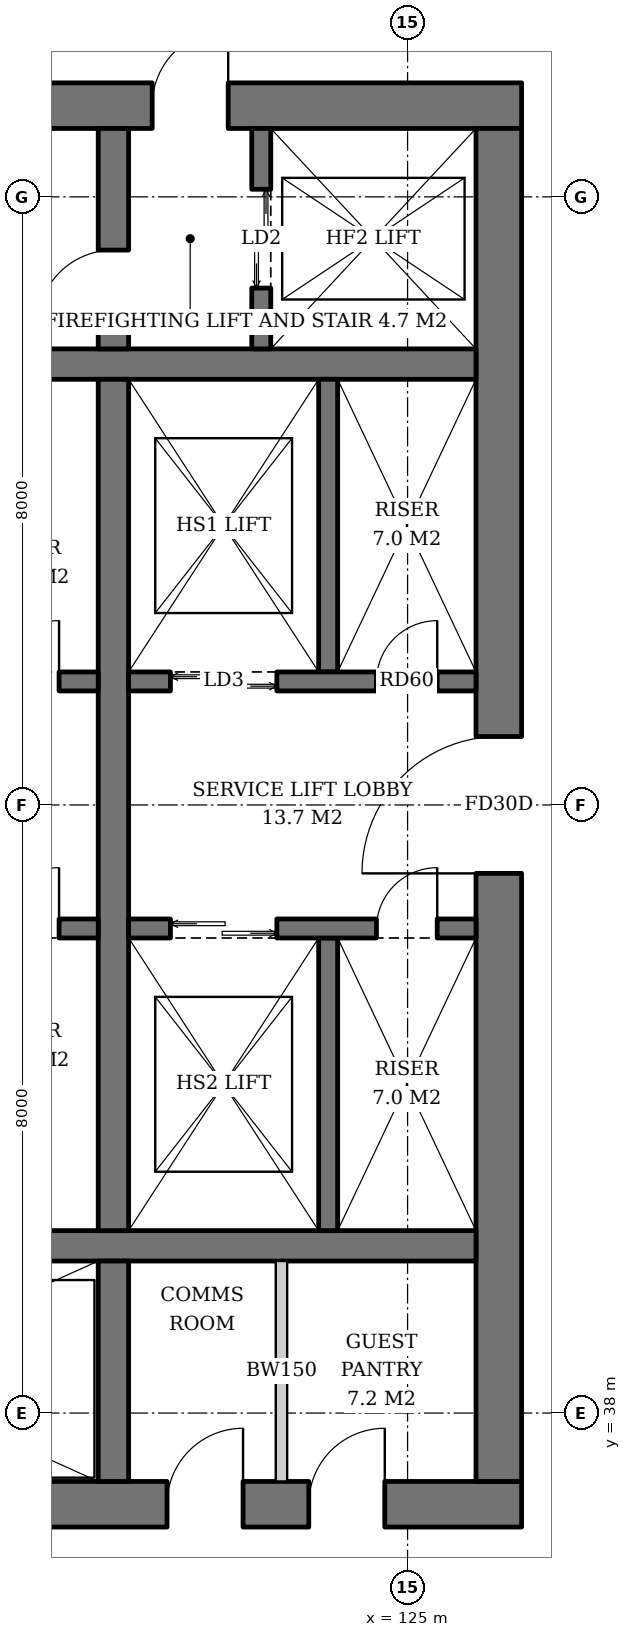
"""IFC4 building model, lengths in metres.
Left out: names, types, materials, properties, quantities, classifications, styles, units other than length and angle.
Written with IfcOpenShell. Run it as: python <this file> out.ifc"""

import sys

from ifc_helpers import new_model, si_unit, direction, frame, frame_2d, origin, place, context, subcontext, project, spatial, rectangle, extrude, element, fill, save


model = new_model("IFC4")
c1 = context("Model", 3, precision=1e-05, world=origin(), true_north=direction((0.0, 1.0)))
c2 = subcontext(c1, "Body", "Model", "MODEL_VIEW")
j1 = project(units=[si_unit("LENGTHUNIT", "METRE"), si_unit("PLANEANGLEUNIT", "RADIAN")], contexts=[c1])
p1 = place(None, origin())
s1 = spatial("IfcSite", under=j1, at=p1, CompositionType="ELEMENT")
p2 = place(p1, origin())
s2 = spatial("IfcBuilding", under=s1, at=p2, CompositionType="ELEMENT")
p3 = place(p2, frame((0.0, 0.0, 112.2)))
s3 = spatial("IfcBuildingStorey", under=s2, at=p3, CompositionType="ELEMENT", Elevation=112.2)
p4 = place(p3, frame((107.5, 36.8, 0.0), z_axis=(0.0, 0.0, 1.0), x_axis=(1.0, 0.0, 0.0)))
e1 = element("IfcWall", 1, at=p4, inside=s3, PredefinedType="SHEAR", context=c2, shape_type="SweptSolid", body=[
    extrude(rectangle(XDim=19.0, YDim=0.6, at=frame_2d((9.5, 0.0))), origin(), (0.0, 0.0, 1.0), 3.8),
])
p5 = place(p4, frame((3.9, 0.0, 0.0)))
e2 = element("IfcOpeningElement", 2, at=p5, cuts=e1, PredefinedType="OPENING", context=c2, shape_type="SweptSolid", body=[
    extrude(rectangle(XDim=1.0, YDim=2.1, at=frame_2d((0.5, 1.05))), frame((0.0, 0.31, 0.0), z_axis=(0.0, -1.0, 0.0), x_axis=(1.0, 0.0, 0.0)), (0.0, 0.0, 1.0), 0.62),
])
p6 = place(p4, frame((14.335, 0.0, 0.0)))
e3 = element("IfcOpeningElement", 3, at=p6, cuts=e1, PredefinedType="OPENING", context=c2, shape_type="SweptSolid", body=[
    extrude(rectangle(XDim=1.0, YDim=2.1, at=frame_2d((0.5, 1.05))), frame((0.0, 0.31, 0.0), z_axis=(0.0, -1.0, 0.0), x_axis=(1.0, 0.0, 0.0)), (0.0, 0.0, 1.0), 0.62),
])
p7 = place(p4, frame((16.2, 0.0, 0.0)))
e4 = element("IfcOpeningElement", 4, at=p7, cuts=e1, PredefinedType="OPENING", context=c2, shape_type="SweptSolid", body=[
    extrude(rectangle(XDim=1.0, YDim=2.1, at=frame_2d((0.5, 1.05))), frame((0.0, 0.31, 0.0), z_axis=(0.0, -1.0, 0.0), x_axis=(1.0, 0.0, 0.0)), (0.0, 0.0, 1.0), 0.62),
])
p8 = place(p3, frame((107.5, 55.2, 0.0), z_axis=(0.0, 0.0, 1.0), x_axis=(1.0, 0.0, 0.0)))
e5 = element("IfcWall", 5, at=p8, inside=s3, PredefinedType="SHEAR", context=c2, shape_type="SweptSolid", body=[
    extrude(rectangle(XDim=19.0, YDim=0.6, at=frame_2d((9.5, 0.0))), origin(), (0.0, 0.0, 1.0), 3.8),
])
p9 = place(p8, frame((14.14, 0.0, 0.0)))
e6 = element("IfcOpeningElement", 6, at=p9, cuts=e5, PredefinedType="OPENING", context=c2, shape_type="SweptSolid", body=[
    extrude(rectangle(XDim=1.0, YDim=2.1, at=frame_2d((0.5, 1.05))), frame((0.0, 0.31, 0.0), z_axis=(0.0, -1.0, 0.0), x_axis=(1.0, 0.0, 0.0)), (0.0, 0.0, 1.0), 0.62),
])
p10 = place(p8, frame((2.425, 0.0, 0.0)))
e7 = element("IfcOpeningElement", 7, at=p10, cuts=e5, PredefinedType="OPENING", context=c2, shape_type="SweptSolid", body=[
    extrude(rectangle(XDim=1.0, YDim=2.1, at=frame_2d((0.5, 1.05))), frame((0.0, 0.31, 0.0), z_axis=(0.0, -1.0, 0.0), x_axis=(1.0, 0.0, 0.0)), (0.0, 0.0, 1.0), 0.62),
])
p11 = place(p3, frame((126.2, 37.1, 0.0), z_axis=(0.0, 0.0, 1.0), x_axis=(0.0, 1.0, 0.0)))
e8 = element("IfcWall", 8, at=p11, inside=s3, PredefinedType="SHEAR", context=c2, shape_type="SweptSolid", body=[
    extrude(rectangle(XDim=17.8, YDim=0.6, at=frame_2d((8.9, 0.0))), origin(), (0.0, 0.0, 1.0), 3.8),
])
p12 = place(p11, frame((8.0, 0.0, 0.0)))
e9 = element("IfcOpeningElement", 9, at=p12, cuts=e8, PredefinedType="OPENING", context=c2, shape_type="SweptSolid", body=[
    extrude(rectangle(XDim=1.8, YDim=2.4, at=frame_2d((0.9, 1.2))), frame((0.0, 0.31, 0.0), z_axis=(0.0, -1.0, 0.0), x_axis=(1.0, 0.0, 0.0)), (0.0, 0.0, 1.0), 0.62),
])
for number, where, z_axis, x_axis in (
    (10, (108.1, 40.2, 0.0), (0.0, 0.0, 1.0), (1.0, 0.0, 0.0)),
    (11, (108.1, 51.8, 0.0), (0.0, 0.0, 1.0), (1.0, 0.0, 0.0)),
):
    element("IfcWall", number, at=place(p3, frame(where, z_axis=z_axis, x_axis=x_axis)), inside=s3, PredefinedType="SHEAR", context=c2, shape_type="SweptSolid", body=[
        extrude(rectangle(XDim=17.8, YDim=0.4, at=frame_2d((8.9, 0.0))), origin(), (0.0, 0.0, 1.0), 3.8),
    ])
p13 = place(p3, frame((121.13, 37.1, 0.0), z_axis=(0.0, 0.0, 1.0), x_axis=(0.0, 1.0, 0.0)))
e12 = element("IfcWall", 12, at=p13, inside=s3, PredefinedType="SHEAR", context=c2, shape_type="SweptSolid", body=[
    extrude(rectangle(XDim=2.9, YDim=0.4, at=frame_2d((1.45, 0.0))), origin(), (0.0, 0.0, 1.0), 3.8),
])
p14 = place(p3, frame((121.13, 40.4, 0.0), z_axis=(0.0, 0.0, 1.0), x_axis=(0.0, 1.0, 0.0)))
e13 = element("IfcWall", 13, at=p14, inside=s3, PredefinedType="SHEAR", context=c2, shape_type="SweptSolid", body=[
    extrude(rectangle(XDim=11.2, YDim=0.4, at=frame_2d((5.6, 0.0))), origin(), (0.0, 0.0, 1.0), 3.8),
])
p15 = place(p3, frame((121.13, 52.0, 0.0), z_axis=(0.0, 0.0, 1.0), x_axis=(0.0, 1.0, 0.0)))
e14 = element("IfcWall", 14, at=p15, inside=s3, PredefinedType="SHEAR", context=c2, shape_type="SweptSolid", body=[
    extrude(rectangle(XDim=2.9, YDim=0.4, at=frame_2d((1.45, 0.0))), origin(), (0.0, 0.0, 1.0), 3.8),
])
p16 = place(p15, frame((0.3, 0.0, 0.0)))
e15 = element("IfcOpeningElement", 15, at=p16, cuts=e14, PredefinedType="OPENING", context=c2, shape_type="SweptSolid", body=[
    extrude(rectangle(XDim=1.0, YDim=2.1, at=frame_2d((0.5, 1.05))), frame((0.0, 0.21, 0.0), z_axis=(0.0, -1.0, 0.0), x_axis=(1.0, 0.0, 0.0)), (0.0, 0.0, 1.0), 0.42),
])
p17 = place(p3, frame((123.075, 52.0, 0.0), z_axis=(0.0, 0.0, 1.0), x_axis=(0.0, 1.0, 0.0)))
e16 = element("IfcWall", 16, at=p17, inside=s3, PredefinedType="SHEAR", context=c2, shape_type="SweptSolid", body=[
    extrude(rectangle(XDim=2.9, YDim=0.25, at=frame_2d((1.45, 0.0))), origin(), (0.0, 0.0, 1.0), 3.8),
])
p18 = place(p17, frame((0.8, 0.0, 0.0)))
e17 = element("IfcOpeningElement", 17, at=p18, cuts=e16, PredefinedType="OPENING", context=c2, shape_type="SweptSolid", body=[
    extrude(rectangle(XDim=1.3, YDim=2.2, at=frame_2d((0.65, 1.1))), frame((0.0, 0.135, 0.0), z_axis=(0.0, -1.0, 0.0), x_axis=(1.0, 0.0, 0.0)), (0.0, 0.0, 1.0), 0.27),
])
p19 = place(p3, frame((108.1, 47.625, 0.0), z_axis=(0.0, 0.0, 1.0), x_axis=(1.0, 0.0, 0.0)))
e18 = element("IfcWall", 18, at=p19, inside=s3, PredefinedType="SHEAR", context=c2, shape_type="SweptSolid", body=[
    extrude(rectangle(XDim=12.83, YDim=0.25, at=frame_2d((6.415, 0.0))), origin(), (0.0, 0.0, 1.0), 3.8),
])
p20 = place(p19, frame((0.7, 0.0, 0.0)))
e19 = element("IfcOpeningElement", 19, at=p20, cuts=e18, PredefinedType="OPENING", context=c2, shape_type="SweptSolid", body=[
    extrude(rectangle(XDim=1.1, YDim=2.2, at=frame_2d((0.55, 1.1))), frame((0.0, 0.135, 0.0), z_axis=(0.0, -1.0, 0.0), x_axis=(1.0, 0.0, 0.0)), (0.0, 0.0, 1.0), 0.27),
])
p21 = place(p19, frame((3.45, 0.0, 0.0)))
e20 = element("IfcOpeningElement", 20, at=p21, cuts=e18, PredefinedType="OPENING", context=c2, shape_type="SweptSolid", body=[
    extrude(rectangle(XDim=1.1, YDim=2.2, at=frame_2d((0.55, 1.1))), frame((0.0, 0.135, 0.0), z_axis=(0.0, -1.0, 0.0), x_axis=(1.0, 0.0, 0.0)), (0.0, 0.0, 1.0), 0.27),
])
p22 = place(p19, frame((6.2, 0.0, 0.0)))
e21 = element("IfcOpeningElement", 21, at=p22, cuts=e18, PredefinedType="OPENING", context=c2, shape_type="SweptSolid", body=[
    extrude(rectangle(XDim=1.1, YDim=2.2, at=frame_2d((0.55, 1.1))), frame((0.0, 0.135, 0.0), z_axis=(0.0, -1.0, 0.0), x_axis=(1.0, 0.0, 0.0)), (0.0, 0.0, 1.0), 0.27),
])
p23 = place(p19, frame((8.95, 0.0, 0.0)))
e22 = element("IfcOpeningElement", 22, at=p23, cuts=e18, PredefinedType="OPENING", context=c2, shape_type="SweptSolid", body=[
    extrude(rectangle(XDim=1.1, YDim=2.2, at=frame_2d((0.55, 1.1))), frame((0.0, 0.135, 0.0), z_axis=(0.0, -1.0, 0.0), x_axis=(1.0, 0.0, 0.0)), (0.0, 0.0, 1.0), 0.27),
])
p24 = place(p19, frame((11.515, 0.0, 0.0)))
e23 = element("IfcOpeningElement", 23, at=p24, cuts=e18, PredefinedType="OPENING", context=c2, shape_type="SweptSolid", body=[
    extrude(rectangle(XDim=0.8, YDim=2.0, at=frame_2d((0.4, 1.0))), frame((0.0, 0.135, 0.0), z_axis=(0.0, -1.0, 0.0), x_axis=(1.0, 0.0, 0.0)), (0.0, 0.0, 1.0), 0.27),
])
p25 = place(p3, frame((108.1, 44.375, 0.0), z_axis=(0.0, 0.0, 1.0), x_axis=(1.0, 0.0, 0.0)))
e24 = element("IfcWall", 24, at=p25, inside=s3, PredefinedType="SHEAR", context=c2, shape_type="SweptSolid", body=[
    extrude(rectangle(XDim=12.83, YDim=0.25, at=frame_2d((6.415, 0.0))), origin(), (0.0, 0.0, 1.0), 3.8),
])
p26 = place(p25, frame((0.7, 0.0, 0.0)))
e25 = element("IfcOpeningElement", 25, at=p26, cuts=e24, PredefinedType="OPENING", context=c2, shape_type="SweptSolid", body=[
    extrude(rectangle(XDim=1.1, YDim=2.2, at=frame_2d((0.55, 1.1))), frame((0.0, 0.135, 0.0), z_axis=(0.0, -1.0, 0.0), x_axis=(1.0, 0.0, 0.0)), (0.0, 0.0, 1.0), 0.27),
])
p27 = place(p25, frame((3.45, 0.0, 0.0)))
e26 = element("IfcOpeningElement", 26, at=p27, cuts=e24, PredefinedType="OPENING", context=c2, shape_type="SweptSolid", body=[
    extrude(rectangle(XDim=1.1, YDim=2.2, at=frame_2d((0.55, 1.1))), frame((0.0, 0.135, 0.0), z_axis=(0.0, -1.0, 0.0), x_axis=(1.0, 0.0, 0.0)), (0.0, 0.0, 1.0), 0.27),
])
p28 = place(p25, frame((6.2, 0.0, 0.0)))
e27 = element("IfcOpeningElement", 27, at=p28, cuts=e24, PredefinedType="OPENING", context=c2, shape_type="SweptSolid", body=[
    extrude(rectangle(XDim=1.1, YDim=2.2, at=frame_2d((0.55, 1.1))), frame((0.0, 0.135, 0.0), z_axis=(0.0, -1.0, 0.0), x_axis=(1.0, 0.0, 0.0)), (0.0, 0.0, 1.0), 0.27),
])
p29 = place(p25, frame((9.0, 0.0, 0.0)))
e28 = element("IfcOpeningElement", 28, at=p29, cuts=e24, PredefinedType="OPENING", context=c2, shape_type="SweptSolid", body=[
    extrude(rectangle(XDim=1.0, YDim=2.1, at=frame_2d((0.5, 1.05))), frame((0.0, 0.135, 0.0), z_axis=(0.0, -1.0, 0.0), x_axis=(1.0, 0.0, 0.0)), (0.0, 0.0, 1.0), 0.27),
])
p30 = place(p25, frame((11.515, 0.0, 0.0)))
e29 = element("IfcOpeningElement", 29, at=p30, cuts=e24, PredefinedType="OPENING", context=c2, shape_type="SweptSolid", body=[
    extrude(rectangle(XDim=0.8, YDim=2.0, at=frame_2d((0.4, 1.0))), frame((0.0, 0.135, 0.0), z_axis=(0.0, -1.0, 0.0), x_axis=(1.0, 0.0, 0.0)), (0.0, 0.0, 1.0), 0.27),
])
p31 = place(p3, frame((123.955, 47.75, 0.0), z_axis=(0.0, 0.0, 1.0), x_axis=(0.0, 1.0, 0.0)))
e30 = element("IfcWall", 30, at=p31, inside=s3, PredefinedType="SHEAR", context=c2, shape_type="SweptSolid", body=[
    extrude(rectangle(XDim=3.85, YDim=0.25, at=frame_2d((1.925, 0.0))), origin(), (0.0, 0.0, 1.0), 3.8),
])
p32 = place(p3, frame((121.33, 47.625, 0.0), z_axis=(0.0, 0.0, 1.0), x_axis=(1.0, 0.0, 0.0)))
e31 = element("IfcWall", 31, at=p32, inside=s3, PredefinedType="SHEAR", context=c2, shape_type="SweptSolid", body=[
    extrude(rectangle(XDim=4.57, YDim=0.25, at=frame_2d((2.285, 0.0))), origin(), (0.0, 0.0, 1.0), 3.8),
])
p33 = place(p32, frame((0.55, 0.0, 0.0)))
e32 = element("IfcOpeningElement", 32, at=p33, cuts=e31, PredefinedType="OPENING", context=c2, shape_type="SweptSolid", body=[
    extrude(rectangle(XDim=1.4, YDim=2.4, at=frame_2d((0.7, 1.2))), frame((0.0, 0.135, 0.0), z_axis=(0.0, -1.0, 0.0), x_axis=(1.0, 0.0, 0.0)), (0.0, 0.0, 1.0), 0.27),
])
p34 = place(p32, frame((3.26, 0.0, 0.0)))
e33 = element("IfcOpeningElement", 33, at=p34, cuts=e31, PredefinedType="OPENING", context=c2, shape_type="SweptSolid", body=[
    extrude(rectangle(XDim=0.8, YDim=2.0, at=frame_2d((0.4, 1.0))), frame((0.0, 0.135, 0.0), z_axis=(0.0, -1.0, 0.0), x_axis=(1.0, 0.0, 0.0)), (0.0, 0.0, 1.0), 0.27),
])
p35 = place(p3, frame((123.955, 44.25, 0.0), z_axis=(0.0, 0.0, 1.0), x_axis=(0.0, -1.0, 0.0)))
e34 = element("IfcWall", 34, at=p35, inside=s3, PredefinedType="SHEAR", context=c2, shape_type="SweptSolid", body=[
    extrude(rectangle(XDim=3.85, YDim=0.25, at=frame_2d((1.925, 0.0))), origin(), (0.0, 0.0, 1.0), 3.8),
])
p36 = place(p3, frame((121.33, 44.375, 0.0), z_axis=(0.0, 0.0, 1.0), x_axis=(1.0, 0.0, 0.0)))
e35 = element("IfcWall", 35, at=p36, inside=s3, PredefinedType="SHEAR", context=c2, shape_type="SweptSolid", body=[
    extrude(rectangle(XDim=4.57, YDim=0.25, at=frame_2d((2.285, 0.0))), origin(), (0.0, 0.0, 1.0), 3.8),
])
p37 = place(p36, frame((0.55, 0.0, 0.0)))
e36 = element("IfcOpeningElement", 36, at=p37, cuts=e35, PredefinedType="OPENING", context=c2, shape_type="SweptSolid", body=[
    extrude(rectangle(XDim=1.4, YDim=2.4, at=frame_2d((0.7, 1.2))), frame((0.0, 0.135, 0.0), z_axis=(0.0, -1.0, 0.0), x_axis=(1.0, 0.0, 0.0)), (0.0, 0.0, 1.0), 0.27),
])
p38 = place(p36, frame((3.26, 0.0, 0.0)))
e37 = element("IfcOpeningElement", 37, at=p38, cuts=e35, PredefinedType="OPENING", context=c2, shape_type="SweptSolid", body=[
    extrude(rectangle(XDim=0.8, YDim=2.0, at=frame_2d((0.4, 1.0))), frame((0.0, 0.135, 0.0), z_axis=(0.0, -1.0, 0.0), x_axis=(1.0, 0.0, 0.0)), (0.0, 0.0, 1.0), 0.27),
])
p39 = place(p3, frame((123.341, 37.1, 0.0), z_axis=(0.0, 0.0, 1.0), x_axis=(0.0, 1.0, 0.0)))
e38 = element("IfcWall", 38, at=p39, inside=s3, PredefinedType="SOLIDWALL", context=c2, shape_type="SweptSolid", body=[
    extrude(rectangle(XDim=2.9, YDim=0.15, at=frame_2d((1.45, 0.0))), origin(), (0.0, 0.0, 1.0), 3.6),
])
p40 = place(p18, origin())
e39 = element("IfcDoor", 39, at=p40, inside=s3, OperationType="DOUBLE_DOOR_SLIDING", PredefinedType="DOOR", context=c2, shape_type="SweptSolid", body=[
    extrude(rectangle(XDim=1.3, YDim=2.2, at=frame_2d((0.65, 1.1))), frame((0.0, 0.025, 0.0), z_axis=(0.0, -1.0, 0.0), x_axis=(1.0, 0.0, 0.0)), (0.0, 0.0, 1.0), 0.05),
])
fill(e17, e39)
p41 = place(p24, origin())
e40 = element("IfcDoor", 40, at=p41, inside=s3, OperationType="SINGLE_SWING_RIGHT", PredefinedType="DOOR", context=c2, shape_type="SweptSolid", body=[
    extrude(rectangle(XDim=0.8, YDim=2.0, at=frame_2d((0.4, 1.0))), frame((0.0, 0.025, 0.0), z_axis=(0.0, -1.0, 0.0), x_axis=(1.0, 0.0, 0.0)), (0.0, 0.0, 1.0), 0.05),
])
fill(e23, e40)
p42 = place(p30, origin())
e41 = element("IfcDoor", 41, at=p42, inside=s3, OperationType="SINGLE_SWING_RIGHT", PredefinedType="DOOR", context=c2, shape_type="SweptSolid", body=[
    extrude(rectangle(XDim=0.8, YDim=2.0, at=frame_2d((0.4, 1.0))), frame((0.0, 0.025, 0.0), z_axis=(0.0, -1.0, 0.0), x_axis=(1.0, 0.0, 0.0)), (0.0, 0.0, 1.0), 0.05),
])
fill(e29, e41)
p43 = place(p33, origin())
e42 = element("IfcDoor", 42, at=p43, inside=s3, OperationType="DOUBLE_DOOR_SLIDING", PredefinedType="DOOR", context=c2, shape_type="SweptSolid", body=[
    extrude(rectangle(XDim=1.4, YDim=2.4, at=frame_2d((0.7, 1.2))), frame((0.0, 0.025, 0.0), z_axis=(0.0, -1.0, 0.0), x_axis=(1.0, 0.0, 0.0)), (0.0, 0.0, 1.0), 0.05),
])
fill(e32, e42)
p44 = place(p34, origin())
e43 = element("IfcDoor", 43, at=p44, inside=s3, OperationType="SINGLE_SWING_RIGHT", PredefinedType="DOOR", context=c2, shape_type="SweptSolid", body=[
    extrude(rectangle(XDim=0.8, YDim=2.0, at=frame_2d((0.4, 1.0))), frame((0.0, 0.025, 0.0), z_axis=(0.0, -1.0, 0.0), x_axis=(1.0, 0.0, 0.0)), (0.0, 0.0, 1.0), 0.05),
])
fill(e33, e43)
p45 = place(p37, origin())
e44 = element("IfcDoor", 44, at=p45, inside=s3, OperationType="DOUBLE_DOOR_SLIDING", PredefinedType="DOOR", context=c2, shape_type="SweptSolid", body=[
    extrude(rectangle(XDim=1.4, YDim=2.4, at=frame_2d((0.7, 1.2))), frame((0.0, 0.025, 0.0), z_axis=(0.0, -1.0, 0.0), x_axis=(1.0, 0.0, 0.0)), (0.0, 0.0, 1.0), 0.05),
])
fill(e36, e44)
p46 = place(p38, origin())
e45 = element("IfcDoor", 45, at=p46, inside=s3, OperationType="SINGLE_SWING_RIGHT", PredefinedType="DOOR", context=c2, shape_type="SweptSolid", body=[
    extrude(rectangle(XDim=0.8, YDim=2.0, at=frame_2d((0.4, 1.0))), frame((0.0, 0.025, 0.0), z_axis=(0.0, -1.0, 0.0), x_axis=(1.0, 0.0, 0.0)), (0.0, 0.0, 1.0), 0.05),
])
fill(e37, e45)
p47 = place(p16, origin())
e46 = element("IfcDoor", 46, at=p47, inside=s3, OperationType="SINGLE_SWING_LEFT", PredefinedType="DOOR", context=c2, shape_type="SweptSolid", body=[
    extrude(rectangle(XDim=1.0, YDim=2.1, at=frame_2d((0.5, 1.05))), frame((0.0, 0.025, 0.0), z_axis=(0.0, -1.0, 0.0), x_axis=(1.0, 0.0, 0.0)), (0.0, 0.0, 1.0), 0.05),
])
fill(e15, e46)
p48 = place(p9, origin())
e47 = element("IfcDoor", 47, at=p48, inside=s3, OperationType="SINGLE_SWING_RIGHT", PredefinedType="DOOR", context=c2, shape_type="SweptSolid", body=[
    extrude(rectangle(XDim=1.0, YDim=2.1, at=frame_2d((0.5, 1.05))), frame((0.0, 0.025, 0.0), z_axis=(0.0, -1.0, 0.0), x_axis=(1.0, 0.0, 0.0)), (0.0, 0.0, 1.0), 0.05),
])
fill(e6, e47)
p49 = place(p12, origin())
e48 = element("IfcDoor", 48, at=p49, inside=s3, OperationType="DOUBLE_DOOR_SINGLE_SWING", PredefinedType="DOOR", context=c2, shape_type="SweptSolid", body=[
    extrude(rectangle(XDim=1.8, YDim=2.4, at=frame_2d((0.9, 1.2))), frame((0.0, 0.025, 0.0), z_axis=(0.0, -1.0, 0.0), x_axis=(1.0, 0.0, 0.0)), (0.0, 0.0, 1.0), 0.05),
])
fill(e9, e48)
p50 = place(p6, origin())
e49 = element("IfcDoor", 49, at=p50, inside=s3, OperationType="SINGLE_SWING_RIGHT", PredefinedType="DOOR", context=c2, shape_type="SweptSolid", body=[
    extrude(rectangle(XDim=1.0, YDim=2.1, at=frame_2d((0.5, 1.05))), frame((0.0, 0.29, 0.0), z_axis=(0.0, -1.0, 0.0), x_axis=(1.0, 0.0, 0.0)), (0.0, 0.0, 1.0), 0.05),
])
fill(e3, e49)
p51 = place(p7, origin())
e50 = element("IfcDoor", 50, at=p51, inside=s3, OperationType="SINGLE_SWING_RIGHT", PredefinedType="DOOR", context=c2, shape_type="SweptSolid", body=[
    extrude(rectangle(XDim=1.0, YDim=2.1, at=frame_2d((0.5, 1.05))), frame((0.0, 0.29, 0.0), z_axis=(0.0, -1.0, 0.0), x_axis=(1.0, 0.0, 0.0)), (0.0, 0.0, 1.0), 0.05),
])
fill(e4, e50)
save(model, sys.argv[1])
